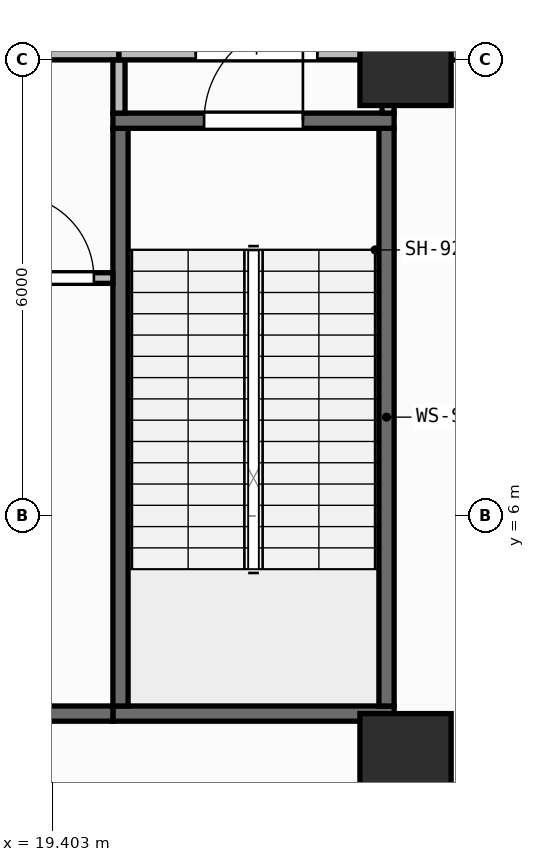
"""IFC4 building model, lengths in metres.
Left out: names, types, materials, properties, quantities, classifications, styles, units other than length and angle.
Written with IfcOpenShell. Run it as: python <this file> out.ifc"""

import sys

from ifc_helpers import new_model, si_unit, direction, frame, frame_2d, origin, origin_2d, place, context, subcontext, project, spatial, rectangle, extrude, element, fill, save


model = new_model("IFC4")
c1 = context("Model", 3, precision=1e-05, world=origin(), true_north=direction((0.0, 1.0)))
c2 = subcontext(c1, "Body", "Model", "MODEL_VIEW")
j1 = project(units=[si_unit("LENGTHUNIT", "METRE"), si_unit("PLANEANGLEUNIT", "RADIAN")], contexts=[c1])
p1 = place(None, origin())
s1 = spatial("IfcSite", under=j1, at=p1, CompositionType="ELEMENT")
p2 = place(p1, origin())
s2 = spatial("IfcBuilding", under=s1, at=p2, CompositionType="ELEMENT")
p3 = place(p2, frame((0.0, 0.0, 174.45)))
s3 = spatial("IfcBuildingStorey", under=s2, at=p3, CompositionType="ELEMENT", Elevation=174.45)
for number, where, z_axis, x_axis in (
    (1, (24.05, 2.8, 0.0), (0.0, 0.0, 1.0), (1.0, 0.0, 0.0)),
    (2, (24.05, 12.0, 0.0), (0.0, 0.0, 1.0), (1.0, 0.0, 0.0)),
):
    element("IfcColumn", number, at=place(p3, frame(where, z_axis=z_axis, x_axis=x_axis)), inside=s3, PredefinedType="COLUMN", context=c2, shape_type="SweptSolid", body=[
        extrude(rectangle(XDim=1.2, YDim=1.2, at=origin_2d()), origin(), (0.0, 0.0, 1.0), 5.8),
    ])
p4 = place(p3, frame((20.2, 3.4, 0.0), z_axis=(0.0, 0.0, 1.0), x_axis=(1.0, 0.0, 0.0)))
e3 = element("IfcWall", 3, at=p4, inside=s3, PredefinedType="SHEAR", context=c2, shape_type="SweptSolid", body=[
    extrude(rectangle(XDim=3.7, YDim=0.2, at=frame_2d((1.85, 0.0))), origin(), (0.0, 0.0, 1.0), 5.56),
])
for number, where, z_axis, x_axis in (
    (4, (20.3, 3.5, 0.0), (0.0, 0.0, 1.0), (0.0, 1.0, 0.0)),
    (5, (23.8, 3.5, 0.0), (0.0, 0.0, 1.0), (0.0, 1.0, 0.0)),
):
    element("IfcWall", number, at=place(p3, frame(where, z_axis=z_axis, x_axis=x_axis)), inside=s3, PredefinedType="SHEAR", context=c2, shape_type="SweptSolid", body=[
        extrude(rectangle(XDim=7.6, YDim=0.2, at=frame_2d((3.8, 0.0))), origin(), (0.0, 0.0, 1.0), 5.56),
    ])
p5 = place(p3, frame((20.2, 11.2, 0.0), z_axis=(0.0, 0.0, 1.0), x_axis=(1.0, 0.0, 0.0)))
e6 = element("IfcWall", 6, at=p5, inside=s3, PredefinedType="SHEAR", context=c2, shape_type="SweptSolid", body=[
    extrude(rectangle(XDim=3.7, YDim=0.2, at=frame_2d((1.85, 0.0))), origin(), (0.0, 0.0, 1.0), 5.56),
])
p6 = place(p5, frame((1.2, 0.0, 0.0)))
e7 = element("IfcOpeningElement", 7, at=p6, cuts=e6, PredefinedType="OPENING", context=c2, shape_type="SweptSolid", body=[
    extrude(rectangle(XDim=1.3, YDim=2.15, at=frame_2d((0.65, 1.075))), frame((0.0, 0.11, 0.0), z_axis=(0.0, -1.0, 0.0), x_axis=(1.0, 0.0, 0.0)), (0.0, 0.0, 1.0), 0.22),
])
p7 = place(p3, frame((6.5, 3.4, 0.0), z_axis=(0.0, 0.0, 1.0), x_axis=(1.0, 0.0, 0.0)))
e8 = element("IfcWall", 8, at=p7, inside=s3, PredefinedType="SHEAR", context=c2, shape_type="SweptSolid", body=[
    extrude(rectangle(XDim=13.7, YDim=0.2, at=frame_2d((6.85, 0.0))), origin(), (0.0, 0.0, 1.0), 5.56),
])
p8 = place(p3, frame((18.61, 9.13, 0.0), z_axis=(0.0, 0.0, 1.0), x_axis=(1.0, 0.0, 0.0)))
e9 = element("IfcWall", 9, at=p8, inside=s3, PredefinedType="PARTITIONING", context=c2, shape_type="SweptSolid", body=[
    extrude(rectangle(XDim=1.59, YDim=0.14, at=frame_2d((0.795, 0.0))), origin(), (0.0, 0.0, 1.0), 5.56),
])
p9 = place(p8, frame((0.24, 0.0, 0.0)))
e10 = element("IfcOpeningElement", 10, at=p9, cuts=e9, PredefinedType="OPENING", context=c2, shape_type="SweptSolid", body=[
    extrude(rectangle(XDim=1.1, YDim=2.1, at=frame_2d((0.55, 1.05))), frame((0.0, 0.08, 0.0), z_axis=(0.0, -1.0, 0.0), x_axis=(1.0, 0.0, 0.0)), (0.0, 0.0, 1.0), 0.16),
])
p10 = place(p3, frame((12.58, 12.08, 0.0), z_axis=(0.0, 0.0, 1.0), x_axis=(1.0, 0.0, 0.0)))
e11 = element("IfcWall", 11, at=p10, inside=s3, PredefinedType="PARTITIONING", context=c2, shape_type="SweptSolid", body=[
    extrude(rectangle(XDim=7.7, YDim=0.16, at=frame_2d((3.85, 0.0))), origin(), (0.0, 0.0, 1.0), 4.835),
])
p11 = place(p10, frame((3.05, 0.0, 0.0)))
e12 = element("IfcOpeningElement", 12, at=p11, cuts=e11, PredefinedType="OPENING", context=c2, shape_type="SweptSolid", body=[
    extrude(rectangle(XDim=1.6, YDim=2.05, at=frame_2d((0.8, 1.025))), frame((0.0, 0.09, 0.0), z_axis=(0.0, -1.0, 0.0), x_axis=(1.0, 0.0, 0.0)), (0.0, 0.0, 1.0), 0.18),
])
p12 = place(p3, frame((20.28, 11.3, 0.0), z_axis=(0.0, 0.0, 1.0), x_axis=(0.0, 1.0, 0.0)))
e13 = element("IfcWall", 13, at=p12, inside=s3, PredefinedType="PARTITIONING", context=c2, shape_type="SweptSolid", body=[
    extrude(rectangle(XDim=0.7, YDim=0.16, at=frame_2d((0.35, 0.0))), origin(), (0.0, 0.0, 1.0), 5.56),
])
p13 = place(p3, frame((20.28, 12.08, 0.0), z_axis=(0.0, 0.0, 1.0), x_axis=(1.0, 0.0, 0.0)))
e14 = element("IfcWall", 14, at=p13, inside=s3, PredefinedType="PARTITIONING", context=c2, shape_type="SweptSolid", body=[
    extrude(rectangle(XDim=3.62, YDim=0.16, at=frame_2d((1.81, 0.0))), origin(), (0.0, 0.0, 1.0), 4.835),
])
p14 = place(p13, frame((1.01, 0.0, 0.0)))
e15 = element("IfcOpeningElement", 15, at=p14, cuts=e14, PredefinedType="OPENING", context=c2, shape_type="SweptSolid", body=[
    extrude(rectangle(XDim=1.6, YDim=2.05, at=frame_2d((0.8, 1.025))), frame((0.0, 0.09, 0.0), z_axis=(0.0, -1.0, 0.0), x_axis=(1.0, 0.0, 0.0)), (0.0, 0.0, 1.0), 0.18),
])
p15 = place(p3, frame((23.82, 11.3, 0.0), z_axis=(0.0, 0.0, 1.0), x_axis=(0.0, 1.0, 0.0)))
e16 = element("IfcWall", 16, at=p15, inside=s3, PredefinedType="PARTITIONING", context=c2, shape_type="SweptSolid", body=[
    extrude(rectangle(XDim=0.7, YDim=0.16, at=frame_2d((0.35, 0.0))), origin(), (0.0, 0.0, 1.0), 5.56),
])
p16 = place(p3, frame((23.92, 12.08, 0.0), z_axis=(0.0, 0.0, 1.0), x_axis=(1.0, 0.0, 0.0)))
e17 = element("IfcWall", 17, at=p16, inside=s3, PredefinedType="PARTITIONING", context=c2, shape_type="SweptSolid", body=[
    extrude(rectangle(XDim=10.26, YDim=0.16, at=frame_2d((5.13, 0.0))), origin(), (0.0, 0.0, 1.0), 4.835),
])
p17 = place(p6, origin())
e18 = element("IfcDoor", 18, at=p17, inside=s3, OperationType="SINGLE_SWING_RIGHT", PredefinedType="DOOR", context=c2, shape_type="SweptSolid", body=[
    extrude(rectangle(XDim=1.3, YDim=2.15, at=frame_2d((0.65, 1.075))), frame((0.0, 0.025, 0.0), z_axis=(0.0, -1.0, 0.0), x_axis=(1.0, 0.0, 0.0)), (0.0, 0.0, 1.0), 0.05),
])
fill(e7, e18)
p18 = place(p9, origin())
e19 = element("IfcDoor", 19, at=p18, inside=s3, OperationType="SINGLE_SWING_LEFT", PredefinedType="DOOR", context=c2, shape_type="SweptSolid", body=[
    extrude(rectangle(XDim=1.1, YDim=2.1, at=frame_2d((0.55, 1.05))), frame((0.0, 0.025, 0.0), z_axis=(0.0, -1.0, 0.0), x_axis=(1.0, 0.0, 0.0)), (0.0, 0.0, 1.0), 0.05),
])
fill(e10, e19)
p19 = place(p14, origin())
e20 = element("IfcDoor", 20, at=p19, inside=s3, OperationType="DOUBLE_DOOR_SINGLE_SWING", PredefinedType="DOOR", context=c2, shape_type="SweptSolid", body=[
    extrude(rectangle(XDim=1.6, YDim=2.05, at=frame_2d((0.8, 1.025))), frame((0.0, 0.025, 0.0), z_axis=(0.0, -1.0, 0.0), x_axis=(1.0, 0.0, 0.0)), (0.0, 0.0, 1.0), 0.05),
])
fill(e15, e20)
save(model, sys.argv[1])
